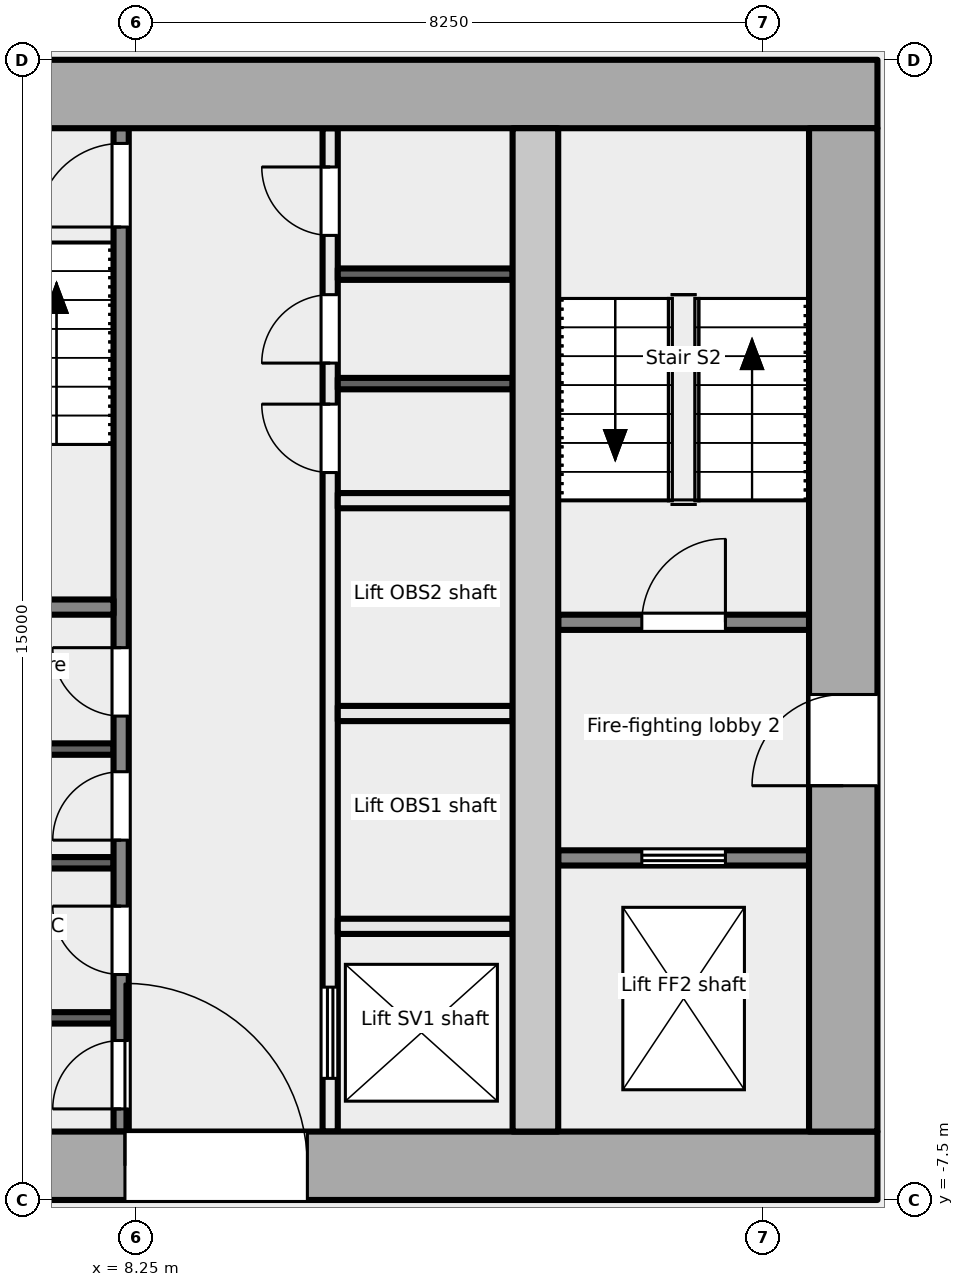
"""IFC4 building model, lengths in metres.
Left out: names, types, materials, properties, quantities, classifications, styles, units other than length and angle.
Written with IfcOpenShell. Run it as: python <this file> out.ifc"""

import sys

from ifc_helpers import new_model, si_unit, direction, frame, frame_2d, origin, place, context, subcontext, project, spatial, rectangle, extrude, element, fill, save


model = new_model("IFC4")
c1 = context("Model", 3, precision=1e-05, world=origin(), true_north=direction((0.0, 1.0)))
c2 = subcontext(c1, "Body", "Model", "MODEL_VIEW")
j1 = project(units=[si_unit("LENGTHUNIT", "METRE"), si_unit("PLANEANGLEUNIT", "RADIAN")], contexts=[c1])
p1 = place(None, origin())
s1 = spatial("IfcSite", under=j1, at=p1, CompositionType="ELEMENT")
p2 = place(p1, origin())
s2 = spatial("IfcBuilding", under=s1, at=p2, CompositionType="ELEMENT")
p3 = place(p2, frame((0.0, 0.0, 163.1)))
s3 = spatial("IfcBuildingStorey", under=s2, at=p3, CompositionType="ELEMENT", Elevation=163.1)
p4 = place(p3, frame((-18.0, -7.05, -0.2), z_axis=(0.0, 0.0, 1.0), x_axis=(1.0, 0.0, 0.0)))
e1 = element("IfcWall", 1, at=p4, inside=s3, PredefinedType="SHEAR", context=c2, shape_type="SweptSolid", body=[
    extrude(rectangle(XDim=36.0, YDim=0.9, at=frame_2d((18.0, 0.0))), origin(), (0.0, 0.0, 1.0), 5.4),
])
p5 = place(p4, frame((7.8, 0.0, 0.2)))
e2 = element("IfcOpeningElement", 2, at=p5, cuts=e1, PredefinedType="OPENING", context=c2, shape_type="SweptSolid", body=[
    extrude(rectangle(XDim=2.4, YDim=2.1, at=frame_2d((1.2, 1.05))), frame((0.0, 0.46, 0.0), z_axis=(0.0, -1.0, 0.0), x_axis=(1.0, 0.0, 0.0)), (0.0, 0.0, 1.0), 0.921),
])
p6 = place(p4, frame((16.8, 0.0, 0.2)))
e3 = element("IfcOpeningElement", 3, at=p6, cuts=e1, PredefinedType="OPENING", context=c2, shape_type="SweptSolid", body=[
    extrude(rectangle(XDim=2.4, YDim=2.1, at=frame_2d((1.2, 1.05))), frame((0.0, 0.46, 0.0), z_axis=(0.0, -1.0, 0.0), x_axis=(1.0, 0.0, 0.0)), (0.0, 0.0, 1.0), 0.921),
])
p7 = place(p4, frame((26.1, 0.0, 0.2)))
e4 = element("IfcOpeningElement", 4, at=p7, cuts=e1, PredefinedType="OPENING", context=c2, shape_type="SweptSolid", body=[
    extrude(rectangle(XDim=2.4, YDim=2.1, at=frame_2d((1.2, 1.05))), frame((0.0, 0.46, 0.0), z_axis=(0.0, -1.0, 0.0), x_axis=(1.0, 0.0, 0.0)), (0.0, 0.0, 1.0), 0.921),
])
p8 = place(p3, frame((-18.0, 7.05, -0.2), z_axis=(0.0, 0.0, 1.0), x_axis=(1.0, 0.0, 0.0)))
e5 = element("IfcWall", 5, at=p8, inside=s3, PredefinedType="SHEAR", context=c2, shape_type="SweptSolid", body=[
    extrude(rectangle(XDim=36.0, YDim=0.9, at=frame_2d((18.0, 0.0))), origin(), (0.0, 0.0, 1.0), 5.4),
])
p9 = place(p3, frame((17.55, -6.6, -0.2), z_axis=(0.0, 0.0, 1.0), x_axis=(0.0, 1.0, 0.0)))
e6 = element("IfcWall", 6, at=p9, inside=s3, PredefinedType="SHEAR", context=c2, shape_type="SweptSolid", body=[
    extrude(rectangle(XDim=13.2, YDim=0.9, at=frame_2d((6.6, 0.0))), origin(), (0.0, 0.0, 1.0), 5.4),
])
p10 = place(p9, frame((4.55, 0.0, 0.2)))
e7 = element("IfcOpeningElement", 7, at=p10, cuts=e6, PredefinedType="OPENING", context=c2, shape_type="SweptSolid", body=[
    extrude(rectangle(XDim=1.2, YDim=2.1, at=frame_2d((0.6, 1.05))), frame((0.0, 0.46, 0.0), z_axis=(0.0, -1.0, 0.0), x_axis=(1.0, 0.0, 0.0)), (0.0, 0.0, 1.0), 0.921),
])
p11 = place(p3, frame((13.5, -6.6, -0.2), z_axis=(0.0, 0.0, 1.0), x_axis=(0.0, 1.0, 0.0)))
e8 = element("IfcWall", 8, at=p11, inside=s3, PredefinedType="SHEAR", context=c2, shape_type="SweptSolid", body=[
    extrude(rectangle(XDim=13.2, YDim=0.6, at=frame_2d((6.6, 0.0))), origin(), (0.0, 0.0, 1.0), 5.4),
])
p12 = place(p3, frame((13.8, -3.0, 0.0), z_axis=(0.0, 0.0, 1.0), x_axis=(1.0, 0.0, 0.0)))
e9 = element("IfcWall", 9, at=p12, inside=s3, PredefinedType="PARTITIONING", context=c2, shape_type="SweptSolid", body=[
    extrude(rectangle(XDim=3.3, YDim=0.2, at=frame_2d((1.65, 0.0))), origin(), (0.0, 0.0, 1.0), 5.2),
])
p13 = place(p12, frame((1.1, 0.0, 0.0)))
e10 = element("IfcOpeningElement", 10, at=p13, cuts=e9, PredefinedType="OPENING", context=c2, shape_type="SweptSolid", body=[
    extrude(rectangle(XDim=1.1, YDim=2.1, at=frame_2d((0.55, 1.05))), frame((0.0, 0.111, 0.0), z_axis=(0.0, -1.0, 0.0), x_axis=(1.0, 0.0, 0.0)), (0.0, 0.0, 1.0), 0.221),
])
p14 = place(p3, frame((13.8, 0.1, 0.0), z_axis=(0.0, 0.0, 1.0), x_axis=(1.0, 0.0, 0.0)))
e11 = element("IfcWall", 11, at=p14, inside=s3, PredefinedType="PARTITIONING", context=c2, shape_type="SweptSolid", body=[
    extrude(rectangle(XDim=3.3, YDim=0.2, at=frame_2d((1.65, 0.0))), origin(), (0.0, 0.0, 1.0), 5.2),
])
p15 = place(p14, frame((1.1, 0.0, 0.0)))
e12 = element("IfcOpeningElement", 12, at=p15, cuts=e11, PredefinedType="OPENING", context=c2, shape_type="SweptSolid", body=[
    extrude(rectangle(XDim=1.1, YDim=2.1, at=frame_2d((0.55, 1.05))), frame((0.0, 0.111, 0.0), z_axis=(0.0, -1.0, 0.0), x_axis=(1.0, 0.0, 0.0)), (0.0, 0.0, 1.0), 0.221),
])
p16 = place(p3, frame((8.05, -6.6, 0.0), z_axis=(0.0, 0.0, 1.0), x_axis=(0.0, 1.0, 0.0)))
e13 = element("IfcWall", 13, at=p16, inside=s3, PredefinedType="PARTITIONING", context=c2, shape_type="SweptSolid", body=[
    extrude(rectangle(XDim=13.2, YDim=0.2, at=frame_2d((6.6, 0.0))), origin(), (0.0, 0.0, 1.0), 5.2),
])
p17 = place(p16, frame((0.298, 0.0, 0.0)))
e14 = element("IfcOpeningElement", 14, at=p17, cuts=e13, PredefinedType="OPENING", context=c2, shape_type="SweptSolid", body=[
    extrude(rectangle(XDim=0.9, YDim=2.1, at=frame_2d((0.45, 1.05))), frame((0.0, 0.111, 0.0), z_axis=(0.0, -1.0, 0.0), x_axis=(1.0, 0.0, 0.0)), (0.0, 0.0, 1.0), 0.221),
])
p18 = place(p16, frame((2.066, 0.0, 0.0)))
e15 = element("IfcOpeningElement", 15, at=p18, cuts=e13, PredefinedType="OPENING", context=c2, shape_type="SweptSolid", body=[
    extrude(rectangle(XDim=0.9, YDim=2.1, at=frame_2d((0.45, 1.05))), frame((0.0, 0.111, 0.0), z_axis=(0.0, -1.0, 0.0), x_axis=(1.0, 0.0, 0.0)), (0.0, 0.0, 1.0), 0.221),
])
p19 = place(p16, frame((3.834, 0.0, 0.0)))
e16 = element("IfcOpeningElement", 16, at=p19, cuts=e13, PredefinedType="OPENING", context=c2, shape_type="SweptSolid", body=[
    extrude(rectangle(XDim=0.9, YDim=2.1, at=frame_2d((0.45, 1.05))), frame((0.0, 0.111, 0.0), z_axis=(0.0, -1.0, 0.0), x_axis=(1.0, 0.0, 0.0)), (0.0, 0.0, 1.0), 0.221),
])
p20 = place(p16, frame((5.466, 0.0, 0.0)))
e17 = element("IfcOpeningElement", 17, at=p20, cuts=e13, PredefinedType="OPENING", context=c2, shape_type="SweptSolid", body=[
    extrude(rectangle(XDim=0.9, YDim=2.1, at=frame_2d((0.45, 1.05))), frame((0.0, 0.111, 0.0), z_axis=(0.0, -1.0, 0.0), x_axis=(1.0, 0.0, 0.0)), (0.0, 0.0, 1.0), 0.221),
])
p21 = place(p16, frame((11.9, 0.0, 0.0)))
e18 = element("IfcOpeningElement", 18, at=p21, cuts=e13, PredefinedType="OPENING", context=c2, shape_type="SweptSolid", body=[
    extrude(rectangle(XDim=1.1, YDim=2.1, at=frame_2d((0.55, 1.05))), frame((0.0, 0.111, 0.0), z_axis=(0.0, -1.0, 0.0), x_axis=(1.0, 0.0, 0.0)), (0.0, 0.0, 1.0), 0.221),
])
p22 = place(p3, frame((10.8, -6.6, 0.0), z_axis=(0.0, 0.0, 1.0), x_axis=(0.0, 1.0, 0.0)))
e19 = element("IfcWall", 19, at=p22, inside=s3, PredefinedType="PARTITIONING", context=c2, shape_type="SweptSolid", body=[
    extrude(rectangle(XDim=13.2, YDim=0.2, at=frame_2d((6.6, 0.0))), origin(), (0.0, 0.0, 1.0), 5.2),
])
p23 = place(p22, frame((0.7, 0.0, 0.0)))
e20 = element("IfcOpeningElement", 20, at=p23, cuts=e19, PredefinedType="OPENING", context=c2, shape_type="SweptSolid", body=[
    extrude(rectangle(XDim=1.2, YDim=2.1, at=frame_2d((0.6, 1.05))), frame((0.0, 0.111, 0.0), z_axis=(0.0, -1.0, 0.0), x_axis=(1.0, 0.0, 0.0)), (0.0, 0.0, 1.0), 0.221),
])
p24 = place(p22, frame((8.67, 0.0, 0.0)))
e21 = element("IfcOpeningElement", 21, at=p24, cuts=e19, PredefinedType="OPENING", context=c2, shape_type="SweptSolid", body=[
    extrude(rectangle(XDim=0.9, YDim=2.1, at=frame_2d((0.45, 1.05))), frame((0.0, 0.111, 0.0), z_axis=(0.0, -1.0, 0.0), x_axis=(1.0, 0.0, 0.0)), (0.0, 0.0, 1.0), 0.221),
])
p25 = place(p22, frame((10.11, 0.0, 0.0)))
e22 = element("IfcOpeningElement", 22, at=p25, cuts=e19, PredefinedType="OPENING", context=c2, shape_type="SweptSolid", body=[
    extrude(rectangle(XDim=0.9, YDim=2.1, at=frame_2d((0.45, 1.05))), frame((0.0, 0.111, 0.0), z_axis=(0.0, -1.0, 0.0), x_axis=(1.0, 0.0, 0.0)), (0.0, 0.0, 1.0), 0.221),
])
p26 = place(p22, frame((11.79, 0.0, 0.0)))
e23 = element("IfcOpeningElement", 23, at=p26, cuts=e19, PredefinedType="OPENING", context=c2, shape_type="SweptSolid", body=[
    extrude(rectangle(XDim=0.9, YDim=2.1, at=frame_2d((0.45, 1.05))), frame((0.0, 0.111, 0.0), z_axis=(0.0, -1.0, 0.0), x_axis=(1.0, 0.0, 0.0)), (0.0, 0.0, 1.0), 0.221),
])
p27 = place(p3, frame((4.8, 0.3, 0.0), z_axis=(0.0, 0.0, 1.0), x_axis=(1.0, 0.0, 0.0)))
e24 = element("IfcWall", 24, at=p27, inside=s3, PredefinedType="PARTITIONING", context=c2, shape_type="SweptSolid", body=[
    extrude(rectangle(XDim=3.15, YDim=0.2, at=frame_2d((1.575, 0.0))), origin(), (0.0, 0.0, 1.0), 5.2),
])
for number, where, z_axis, x_axis in (
    (25, (4.8, -5.104, 0.0), (0.0, 0.0, 1.0), (1.0, 0.0, 0.0)),
    (26, (4.8, -3.064, 0.0), (0.0, 0.0, 1.0), (1.0, 0.0, 0.0)),
    (27, (4.8, -1.568, 0.0), (0.0, 0.0, 1.0), (1.0, 0.0, 0.0)),
):
    element("IfcWall", number, at=place(p3, frame(where, z_axis=z_axis, x_axis=x_axis)), inside=s3, PredefinedType="PARTITIONING", context=c2, shape_type="SweptSolid", body=[
        extrude(rectangle(XDim=3.15, YDim=0.15, at=frame_2d((1.575, 0.0))), origin(), (0.0, 0.0, 1.0), 5.2),
    ])
for number, where, z_axis, x_axis in (
    (28, (10.9, -3.9, 0.0), (0.0, 0.0, 1.0), (1.0, 0.0, 0.0)),
    (29, (10.9, -1.1, 0.0), (0.0, 0.0, 1.0), (1.0, 0.0, 0.0)),
    (30, (10.9, 1.7, 0.0), (0.0, 0.0, 1.0), (1.0, 0.0, 0.0)),
):
    element("IfcWall", number, at=place(p3, frame(where, z_axis=z_axis, x_axis=x_axis)), inside=s3, PredefinedType="PARTITIONING", context=c2, shape_type="SweptSolid", body=[
        extrude(rectangle(XDim=2.3, YDim=0.2, at=frame_2d((1.15, 0.0))), origin(), (0.0, 0.0, 1.0), 5.2),
    ])
for number, where, z_axis, x_axis in (
    (31, (10.9, 3.24, 0.0), (0.0, 0.0, 1.0), (1.0, 0.0, 0.0)),
    (32, (10.9, 4.68, 0.0), (0.0, 0.0, 1.0), (1.0, 0.0, 0.0)),
):
    element("IfcWall", number, at=place(p3, frame(where, z_axis=z_axis, x_axis=x_axis)), inside=s3, PredefinedType="PARTITIONING", context=c2, shape_type="SweptSolid", body=[
        extrude(rectangle(XDim=2.3, YDim=0.15, at=frame_2d((1.15, 0.0))), origin(), (0.0, 0.0, 1.0), 5.2),
    ])
p28 = place(p13, origin())
e33 = element("IfcDoor", 33, at=p28, inside=s3, OperationType="DOUBLE_DOOR_SLIDING", PredefinedType="DOOR", context=c2, shape_type="SweptSolid", body=[
    extrude(rectangle(XDim=1.1, YDim=2.1, at=frame_2d((0.55, 1.05))), frame((0.0, 0.025, 0.0), z_axis=(0.0, -1.0, 0.0), x_axis=(1.0, 0.0, 0.0)), (0.0, 0.0, 1.0), 0.05),
])
fill(e10, e33)
p29 = place(p10, origin())
e34 = element("IfcDoor", 34, at=p29, inside=s3, OperationType="SINGLE_SWING_LEFT", PredefinedType="DOOR", context=c2, shape_type="SweptSolid", body=[
    extrude(rectangle(XDim=1.2, YDim=2.1, at=frame_2d((0.6, 1.05))), frame((0.0, 0.025, 0.0), z_axis=(0.0, -1.0, 0.0), x_axis=(1.0, 0.0, 0.0)), (0.0, 0.0, 1.0), 0.05),
])
fill(e7, e34)
p30 = place(p15, origin())
e35 = element("IfcDoor", 35, at=p30, inside=s3, OperationType="SINGLE_SWING_RIGHT", PredefinedType="DOOR", context=c2, shape_type="SweptSolid", body=[
    extrude(rectangle(XDim=1.1, YDim=2.1, at=frame_2d((0.55, 1.05))), frame((0.0, 0.025, 0.0), z_axis=(0.0, -1.0, 0.0), x_axis=(1.0, 0.0, 0.0)), (0.0, 0.0, 1.0), 0.05),
])
fill(e12, e35)
p31 = place(p17, origin())
e36 = element("IfcDoor", 36, at=p31, inside=s3, OperationType="SINGLE_SWING_LEFT", PredefinedType="DOOR", context=c2, shape_type="SweptSolid", body=[
    extrude(rectangle(XDim=0.9, YDim=2.1, at=frame_2d((0.45, 1.05))), frame((0.0, 0.025, 0.0), z_axis=(0.0, -1.0, 0.0), x_axis=(1.0, 0.0, 0.0)), (0.0, 0.0, 1.0), 0.05),
])
fill(e14, e36)
p32 = place(p18, origin())
e37 = element("IfcDoor", 37, at=p32, inside=s3, OperationType="SINGLE_SWING_RIGHT", PredefinedType="DOOR", context=c2, shape_type="SweptSolid", body=[
    extrude(rectangle(XDim=0.9, YDim=2.1, at=frame_2d((0.45, 1.05))), frame((0.0, 0.025, 0.0), z_axis=(0.0, -1.0, 0.0), x_axis=(1.0, 0.0, 0.0)), (0.0, 0.0, 1.0), 0.05),
])
fill(e15, e37)
p33 = place(p19, origin())
e38 = element("IfcDoor", 38, at=p33, inside=s3, OperationType="SINGLE_SWING_LEFT", PredefinedType="DOOR", context=c2, shape_type="SweptSolid", body=[
    extrude(rectangle(XDim=0.9, YDim=2.1, at=frame_2d((0.45, 1.05))), frame((0.0, 0.025, 0.0), z_axis=(0.0, -1.0, 0.0), x_axis=(1.0, 0.0, 0.0)), (0.0, 0.0, 1.0), 0.05),
])
fill(e16, e38)
p34 = place(p20, origin())
e39 = element("IfcDoor", 39, at=p34, inside=s3, OperationType="SINGLE_SWING_RIGHT", PredefinedType="DOOR", context=c2, shape_type="SweptSolid", body=[
    extrude(rectangle(XDim=0.9, YDim=2.1, at=frame_2d((0.45, 1.05))), frame((0.0, 0.025, 0.0), z_axis=(0.0, -1.0, 0.0), x_axis=(1.0, 0.0, 0.0)), (0.0, 0.0, 1.0), 0.05),
])
fill(e17, e39)
p35 = place(p21, origin())
e40 = element("IfcDoor", 40, at=p35, inside=s3, OperationType="SINGLE_SWING_LEFT", PredefinedType="DOOR", context=c2, shape_type="SweptSolid", body=[
    extrude(rectangle(XDim=1.1, YDim=2.1, at=frame_2d((0.55, 1.05))), frame((0.0, 0.025, 0.0), z_axis=(0.0, -1.0, 0.0), x_axis=(1.0, 0.0, 0.0)), (0.0, 0.0, 1.0), 0.05),
])
fill(e18, e40)
p36 = place(p7, origin())
e41 = element("IfcDoor", 41, at=p36, inside=s3, OperationType="DOUBLE_DOOR_DOUBLE_SWING", PredefinedType="DOOR", context=c2, shape_type="SweptSolid", body=[
    extrude(rectangle(XDim=2.4, YDim=2.1, at=frame_2d((1.2, 1.05))), frame((0.0, 0.025, 0.0), z_axis=(0.0, -1.0, 0.0), x_axis=(1.0, 0.0, 0.0)), (0.0, 0.0, 1.0), 0.05),
])
fill(e4, e41)
p37 = place(p23, origin())
e42 = element("IfcDoor", 42, at=p37, inside=s3, OperationType="DOUBLE_DOOR_SLIDING", PredefinedType="DOOR", context=c2, shape_type="SweptSolid", body=[
    extrude(rectangle(XDim=1.2, YDim=2.1, at=frame_2d((0.6, 1.05))), frame((0.0, 0.025, 0.0), z_axis=(0.0, -1.0, 0.0), x_axis=(1.0, 0.0, 0.0)), (0.0, 0.0, 1.0), 0.05),
])
fill(e20, e42)
p38 = place(p24, origin())
e43 = element("IfcDoor", 43, at=p38, inside=s3, OperationType="SINGLE_SWING_RIGHT", PredefinedType="DOOR", context=c2, shape_type="SweptSolid", body=[
    extrude(rectangle(XDim=0.9, YDim=2.1, at=frame_2d((0.45, 1.05))), frame((0.0, 0.025, 0.0), z_axis=(0.0, -1.0, 0.0), x_axis=(1.0, 0.0, 0.0)), (0.0, 0.0, 1.0), 0.05),
])
fill(e21, e43)
p39 = place(p25, origin())
e44 = element("IfcDoor", 44, at=p39, inside=s3, OperationType="SINGLE_SWING_LEFT", PredefinedType="DOOR", context=c2, shape_type="SweptSolid", body=[
    extrude(rectangle(XDim=0.9, YDim=2.1, at=frame_2d((0.45, 1.05))), frame((0.0, 0.025, 0.0), z_axis=(0.0, -1.0, 0.0), x_axis=(1.0, 0.0, 0.0)), (0.0, 0.0, 1.0), 0.05),
])
fill(e22, e44)
p40 = place(p26, origin())
e45 = element("IfcDoor", 45, at=p40, inside=s3, OperationType="SINGLE_SWING_RIGHT", PredefinedType="DOOR", context=c2, shape_type="SweptSolid", body=[
    extrude(rectangle(XDim=0.9, YDim=2.1, at=frame_2d((0.45, 1.05))), frame((0.0, 0.025, 0.0), z_axis=(0.0, -1.0, 0.0), x_axis=(1.0, 0.0, 0.0)), (0.0, 0.0, 1.0), 0.05),
])
fill(e23, e45)
save(model, sys.argv[1])
